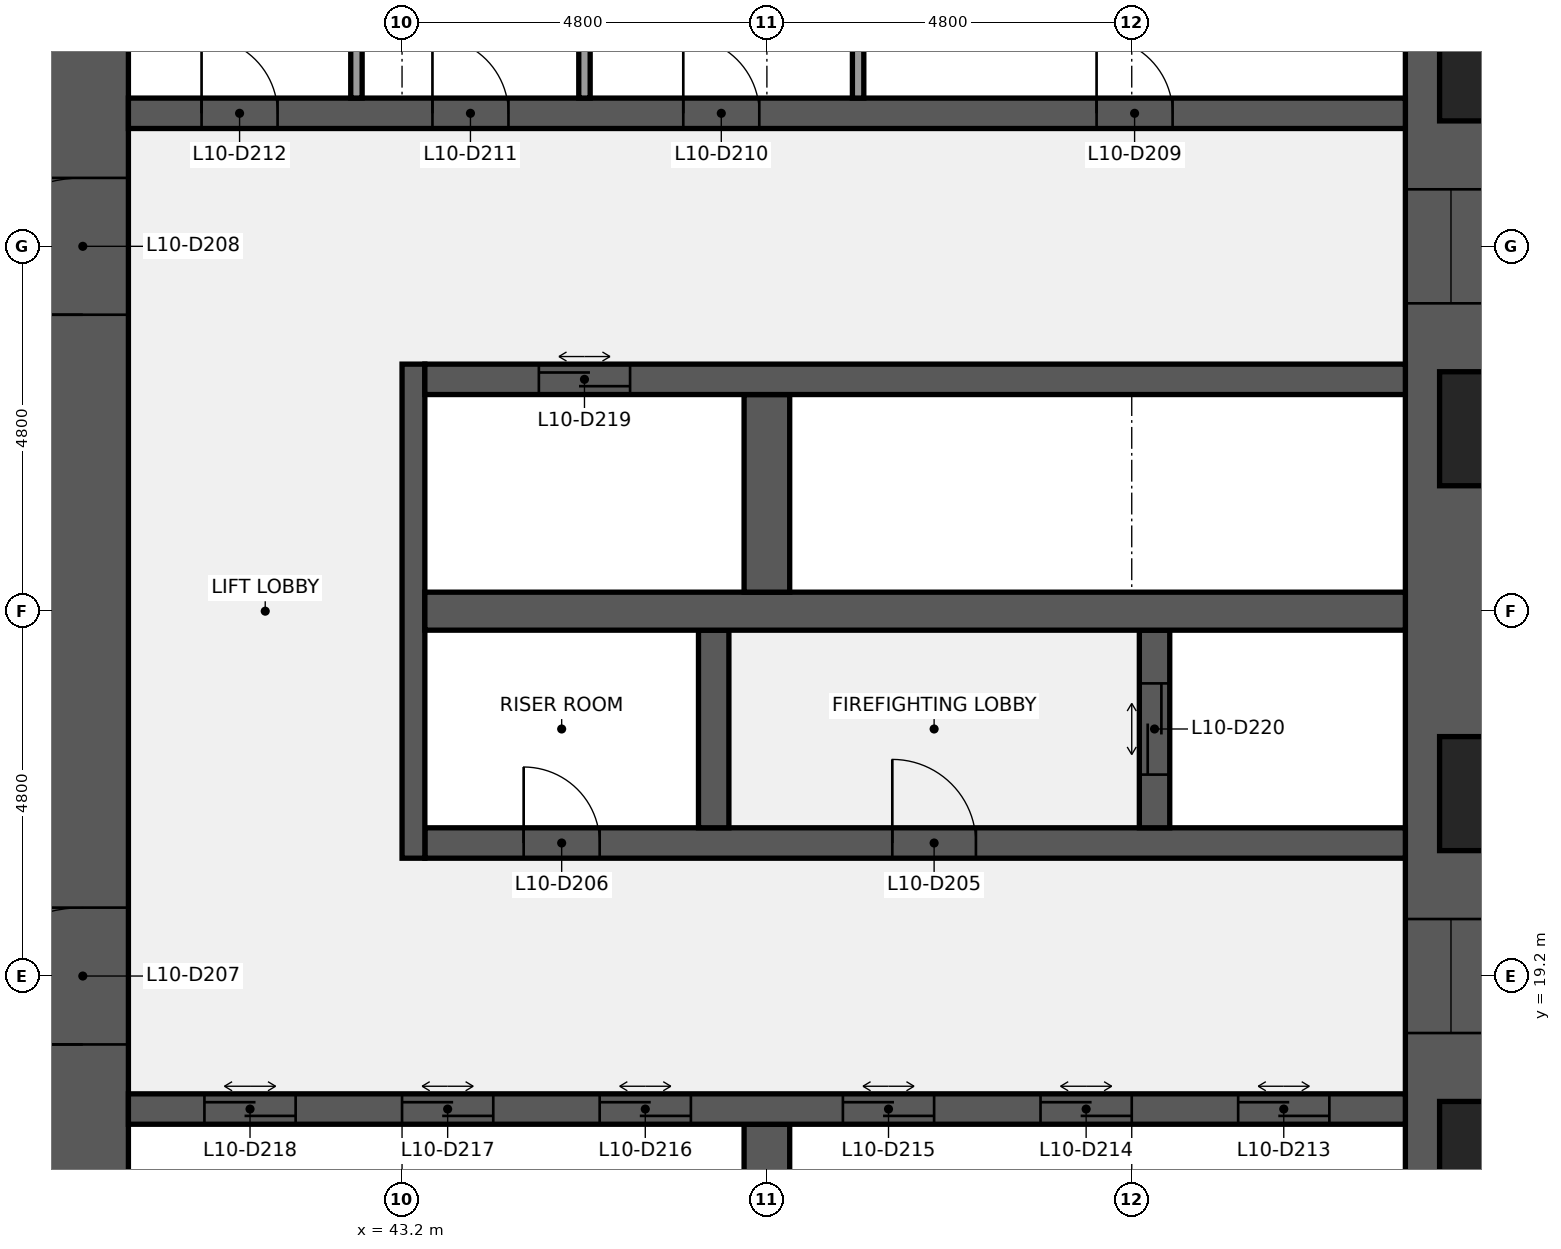
"""IFC4 building model, lengths in metres.
Left out: names, types, materials, properties, quantities, classifications, styles, units other than length and angle.
Written with IfcOpenShell. Run it as: python <this file> out.ifc"""

import sys

from ifc_helpers import new_model, si_unit, direction, frame, frame_2d, origin, place, context, subcontext, project, spatial, rectangle, extrude, element, fill, save


model = new_model("IFC4")
c1 = context("Model", 3, precision=1e-05, world=origin(), true_north=direction((0.0, 1.0)))
c2 = subcontext(c1, "Body", "Model", "MODEL_VIEW")
j1 = project(units=[si_unit("LENGTHUNIT", "METRE"), si_unit("PLANEANGLEUNIT", "RADIAN")], contexts=[c1])
p1 = place(None, origin())
s1 = spatial("IfcSite", under=j1, at=p1, CompositionType="ELEMENT")
p2 = place(p1, origin())
s2 = spatial("IfcBuilding", under=s1, at=p2, CompositionType="ELEMENT")
p3 = place(p2, frame((0.0, 0.0, 51.0)))
s3 = spatial("IfcBuildingStorey", under=s2, at=p3, CompositionType="ELEMENT", Elevation=51.0)
p4 = place(p3, frame((57.0, 38.4, 0.0), z_axis=(0.0, 0.0, 1.0), x_axis=(0.0, -1.0, 0.0)))
e1 = element("IfcWall", 1, at=p4, inside=s3, PredefinedType="SHEAR", context=c2, shape_type="SweptSolid", body=[
    extrude(rectangle(XDim=28.8, YDim=1.2, at=frame_2d((14.4, 0.0))), origin(), (0.0, 0.0, 1.0), 3.84),
])
p5 = place(p4, frame((18.45, 0.0, 0.9)))
e2 = element("IfcOpeningElement", 2, at=p5, cuts=e1, PredefinedType="OPENING", context=c2, shape_type="SweptSolid", body=[
    extrude(rectangle(XDim=1.5, YDim=1.5, at=frame_2d((0.75, 0.75))), frame((0.0, 0.61, 0.0), z_axis=(0.0, -1.0, 0.0), x_axis=(1.0, 0.0, 0.0)), (0.0, 0.0, 1.0), 1.22),
])
p6 = place(p4, frame((8.85, 0.0, 0.9)))
e3 = element("IfcOpeningElement", 3, at=p6, cuts=e1, PredefinedType="OPENING", context=c2, shape_type="SweptSolid", body=[
    extrude(rectangle(XDim=1.5, YDim=1.5, at=frame_2d((0.75, 0.75))), frame((0.0, 0.61, 0.0), z_axis=(0.0, -1.0, 0.0), x_axis=(1.0, 0.0, 0.0)), (0.0, 0.0, 1.0), 1.22),
])
p7 = place(p3, frame((39.0, 9.6, 0.0), z_axis=(0.0, 0.0, 1.0), x_axis=(0.0, 1.0, 0.0)))
e4 = element("IfcWall", 4, at=p7, inside=s3, PredefinedType="SHEAR", context=c2, shape_type="SweptSolid", body=[
    extrude(rectangle(XDim=28.8, YDim=1.2, at=frame_2d((14.4, 0.0))), origin(), (0.0, 0.0, 1.0), 3.84),
])
p8 = place(p7, frame((8.7, 0.0, 0.0)))
e5 = element("IfcOpeningElement", 5, at=p8, cuts=e4, PredefinedType="OPENING", context=c2, shape_type="SweptSolid", body=[
    extrude(rectangle(XDim=1.8, YDim=2.1, at=frame_2d((0.9, 1.05))), frame((0.0, 0.61, 0.0), z_axis=(0.0, -1.0, 0.0), x_axis=(1.0, 0.0, 0.0)), (0.0, 0.0, 1.0), 1.22),
])
p9 = place(p7, frame((18.3, 0.0, 0.0)))
e6 = element("IfcOpeningElement", 6, at=p9, cuts=e4, PredefinedType="OPENING", context=c2, shape_type="SweptSolid", body=[
    extrude(rectangle(XDim=1.8, YDim=2.1, at=frame_2d((0.9, 1.05))), frame((0.0, 0.61, 0.0), z_axis=(0.0, -1.0, 0.0), x_axis=(1.0, 0.0, 0.0)), (0.0, 0.0, 1.0), 1.22),
])
p10 = place(p3, frame((48.0, 14.65, 0.0), z_axis=(0.0, 0.0, 1.0), x_axis=(0.0, 1.0, 0.0)))
e7 = element("IfcWall", 7, at=p10, inside=s3, PredefinedType="SHEAR", context=c2, shape_type="SweptSolid", body=[
    extrude(rectangle(XDim=2.6, YDim=0.6, at=frame_2d((1.3, 0.0))), origin(), (0.0, 0.0, 1.0), 3.84),
])
p11 = place(p3, frame((39.6, 17.45, 0.0), z_axis=(0.0, 0.0, 1.0), x_axis=(1.0, 0.0, 0.0)))
e8 = element("IfcWall", 8, at=p11, inside=s3, PredefinedType="SHEAR", context=c2, shape_type="SweptSolid", body=[
    extrude(rectangle(XDim=16.8, YDim=0.4, at=frame_2d((8.4, 0.0))), origin(), (0.0, 0.0, 1.0), 3.84),
])
p12 = place(p11, frame((14.6, 0.0, 0.0)))
e9 = element("IfcOpeningElement", 9, at=p12, cuts=e8, PredefinedType="OPENING", context=c2, shape_type="SweptSolid", body=[
    extrude(rectangle(XDim=1.2, YDim=2.1, at=frame_2d((0.6, 1.05))), frame((0.0, 0.21, 0.0), z_axis=(0.0, -1.0, 0.0), x_axis=(1.0, 0.0, 0.0)), (0.0, 0.0, 1.0), 0.42),
])
p13 = place(p11, frame((12.0, 0.0, 0.0)))
e10 = element("IfcOpeningElement", 10, at=p13, cuts=e8, PredefinedType="OPENING", context=c2, shape_type="SweptSolid", body=[
    extrude(rectangle(XDim=1.2, YDim=2.1, at=frame_2d((0.6, 1.05))), frame((0.0, 0.21, 0.0), z_axis=(0.0, -1.0, 0.0), x_axis=(1.0, 0.0, 0.0)), (0.0, 0.0, 1.0), 0.42),
])
p14 = place(p11, frame((9.4, 0.0, 0.0)))
e11 = element("IfcOpeningElement", 11, at=p14, cuts=e8, PredefinedType="OPENING", context=c2, shape_type="SweptSolid", body=[
    extrude(rectangle(XDim=1.2, YDim=2.1, at=frame_2d((0.6, 1.05))), frame((0.0, 0.21, 0.0), z_axis=(0.0, -1.0, 0.0), x_axis=(1.0, 0.0, 0.0)), (0.0, 0.0, 1.0), 0.42),
])
p15 = place(p11, frame((6.2, 0.0, 0.0)))
e12 = element("IfcOpeningElement", 12, at=p15, cuts=e8, PredefinedType="OPENING", context=c2, shape_type="SweptSolid", body=[
    extrude(rectangle(XDim=1.2, YDim=2.1, at=frame_2d((0.6, 1.05))), frame((0.0, 0.21, 0.0), z_axis=(0.0, -1.0, 0.0), x_axis=(1.0, 0.0, 0.0)), (0.0, 0.0, 1.0), 0.42),
])
p16 = place(p11, frame((3.6, 0.0, 0.0)))
e13 = element("IfcOpeningElement", 13, at=p16, cuts=e8, PredefinedType="OPENING", context=c2, shape_type="SweptSolid", body=[
    extrude(rectangle(XDim=1.2, YDim=2.1, at=frame_2d((0.6, 1.05))), frame((0.0, 0.21, 0.0), z_axis=(0.0, -1.0, 0.0), x_axis=(1.0, 0.0, 0.0)), (0.0, 0.0, 1.0), 0.42),
])
p17 = place(p11, frame((1.0, 0.0, 0.0)))
e14 = element("IfcOpeningElement", 14, at=p17, cuts=e8, PredefinedType="OPENING", context=c2, shape_type="SweptSolid", body=[
    extrude(rectangle(XDim=1.2, YDim=2.1, at=frame_2d((0.6, 1.05))), frame((0.0, 0.21, 0.0), z_axis=(0.0, -1.0, 0.0), x_axis=(1.0, 0.0, 0.0)), (0.0, 0.0, 1.0), 0.42),
])
p18 = place(p3, frame((43.5, 20.95, 0.0), z_axis=(0.0, 0.0, 1.0), x_axis=(1.0, 0.0, 0.0)))
e15 = element("IfcWall", 15, at=p18, inside=s3, PredefinedType="SHEAR", context=c2, shape_type="SweptSolid", body=[
    extrude(rectangle(XDim=12.9, YDim=0.4, at=frame_2d((6.45, 0.0))), origin(), (0.0, 0.0, 1.0), 3.84),
])
p19 = place(p18, frame((6.15, 0.0, 0.0)))
e16 = element("IfcOpeningElement", 16, at=p19, cuts=e15, PredefinedType="OPENING", context=c2, shape_type="SweptSolid", body=[
    extrude(rectangle(XDim=1.1, YDim=2.1, at=frame_2d((0.55, 1.05))), frame((0.0, 0.21, 0.0), z_axis=(0.0, -1.0, 0.0), x_axis=(1.0, 0.0, 0.0)), (0.0, 0.0, 1.0), 0.42),
])
p20 = place(p18, frame((1.3, 0.0, 0.0)))
e17 = element("IfcOpeningElement", 17, at=p20, cuts=e15, PredefinedType="OPENING", context=c2, shape_type="SweptSolid", body=[
    extrude(rectangle(XDim=1.0, YDim=2.1, at=frame_2d((0.5, 1.05))), frame((0.0, 0.21, 0.0), z_axis=(0.0, -1.0, 0.0), x_axis=(1.0, 0.0, 0.0)), (0.0, 0.0, 1.0), 0.42),
])
p21 = place(p3, frame((43.35, 20.75, 0.0), z_axis=(0.0, 0.0, 1.0), x_axis=(0.0, 1.0, 0.0)))
e18 = element("IfcWall", 18, at=p21, inside=s3, PredefinedType="SHEAR", context=c2, shape_type="SweptSolid", body=[
    extrude(rectangle(XDim=6.5, YDim=0.3, at=frame_2d((3.25, 0.0))), origin(), (0.0, 0.0, 1.0), 3.84),
])
p22 = place(p3, frame((53.1, 21.15, 0.0), z_axis=(0.0, 0.0, 1.0), x_axis=(0.0, 1.0, 0.0)))
e19 = element("IfcWall", 19, at=p22, inside=s3, PredefinedType="SHEAR", context=c2, shape_type="SweptSolid", body=[
    extrude(rectangle(XDim=2.6, YDim=0.4, at=frame_2d((1.3, 0.0))), origin(), (0.0, 0.0, 1.0), 3.84),
])
p23 = place(p22, frame((0.7, 0.0, 0.0)))
e20 = element("IfcOpeningElement", 20, at=p23, cuts=e19, PredefinedType="OPENING", context=c2, shape_type="SweptSolid", body=[
    extrude(rectangle(XDim=1.2, YDim=2.1, at=frame_2d((0.6, 1.05))), frame((0.0, 0.21, 0.0), z_axis=(0.0, -1.0, 0.0), x_axis=(1.0, 0.0, 0.0)), (0.0, 0.0, 1.0), 0.42),
])
p24 = place(p3, frame((47.3, 21.15, 0.0), z_axis=(0.0, 0.0, 1.0), x_axis=(0.0, 1.0, 0.0)))
e21 = element("IfcWall", 21, at=p24, inside=s3, PredefinedType="SHEAR", context=c2, shape_type="SweptSolid", body=[
    extrude(rectangle(XDim=2.6, YDim=0.4, at=frame_2d((1.3, 0.0))), origin(), (0.0, 0.0, 1.0), 3.84),
])
p25 = place(p3, frame((43.5, 24.0, 0.0), z_axis=(0.0, 0.0, 1.0), x_axis=(1.0, 0.0, 0.0)))
e22 = element("IfcWall", 22, at=p25, inside=s3, PredefinedType="SHEAR", context=c2, shape_type="SweptSolid", body=[
    extrude(rectangle(XDim=12.9, YDim=0.5, at=frame_2d((6.45, 0.0))), origin(), (0.0, 0.0, 1.0), 3.84),
])
p26 = place(p3, frame((48.0, 24.25, 0.0), z_axis=(0.0, 0.0, 1.0), x_axis=(0.0, 1.0, 0.0)))
e23 = element("IfcWall", 23, at=p26, inside=s3, PredefinedType="SHEAR", context=c2, shape_type="SweptSolid", body=[
    extrude(rectangle(XDim=2.6, YDim=0.6, at=frame_2d((1.3, 0.0))), origin(), (0.0, 0.0, 1.0), 3.84),
])
p27 = place(p3, frame((43.5, 27.05, 0.0), z_axis=(0.0, 0.0, 1.0), x_axis=(1.0, 0.0, 0.0)))
e24 = element("IfcWall", 24, at=p27, inside=s3, PredefinedType="SHEAR", context=c2, shape_type="SweptSolid", body=[
    extrude(rectangle(XDim=12.9, YDim=0.4, at=frame_2d((6.45, 0.0))), origin(), (0.0, 0.0, 1.0), 3.84),
])
p28 = place(p27, frame((1.5, 0.0, 0.0)))
e25 = element("IfcOpeningElement", 25, at=p28, cuts=e24, PredefinedType="OPENING", context=c2, shape_type="SweptSolid", body=[
    extrude(rectangle(XDim=1.2, YDim=2.1, at=frame_2d((0.6, 1.05))), frame((0.0, 0.21, 0.0), z_axis=(0.0, -1.0, 0.0), x_axis=(1.0, 0.0, 0.0)), (0.0, 0.0, 1.0), 0.42),
])
p29 = place(p3, frame((39.6, 30.55, 0.0), z_axis=(0.0, 0.0, 1.0), x_axis=(1.0, 0.0, 0.0)))
e26 = element("IfcWall", 26, at=p29, inside=s3, PredefinedType="SHEAR", context=c2, shape_type="SweptSolid", body=[
    extrude(rectangle(XDim=16.8, YDim=0.4, at=frame_2d((8.4, 0.0))), origin(), (0.0, 0.0, 1.0), 3.84),
])
p30 = place(p29, frame((12.738, 0.0, 0.0)))
e27 = element("IfcOpeningElement", 27, at=p30, cuts=e26, PredefinedType="OPENING", context=c2, shape_type="SweptSolid", body=[
    extrude(rectangle(XDim=1.0, YDim=2.1, at=frame_2d((0.5, 1.05))), frame((0.0, 0.21, 0.0), z_axis=(0.0, -1.0, 0.0), x_axis=(1.0, 0.0, 0.0)), (0.0, 0.0, 1.0), 0.42),
])
p31 = place(p29, frame((7.3, 0.0, 0.0)))
e28 = element("IfcOpeningElement", 28, at=p31, cuts=e26, PredefinedType="OPENING", context=c2, shape_type="SweptSolid", body=[
    extrude(rectangle(XDim=1.0, YDim=2.1, at=frame_2d((0.5, 1.05))), frame((0.0, 0.21, 0.0), z_axis=(0.0, -1.0, 0.0), x_axis=(1.0, 0.0, 0.0)), (0.0, 0.0, 1.0), 0.42),
])
p32 = place(p29, frame((4.0, 0.0, 0.0)))
e29 = element("IfcOpeningElement", 29, at=p32, cuts=e26, PredefinedType="OPENING", context=c2, shape_type="SweptSolid", body=[
    extrude(rectangle(XDim=1.0, YDim=2.1, at=frame_2d((0.5, 1.05))), frame((0.0, 0.21, 0.0), z_axis=(0.0, -1.0, 0.0), x_axis=(1.0, 0.0, 0.0)), (0.0, 0.0, 1.0), 0.42),
])
p33 = place(p29, frame((0.962, 0.0, 0.0)))
e30 = element("IfcOpeningElement", 30, at=p33, cuts=e26, PredefinedType="OPENING", context=c2, shape_type="SweptSolid", body=[
    extrude(rectangle(XDim=1.0, YDim=2.1, at=frame_2d((0.5, 1.05))), frame((0.0, 0.21, 0.0), z_axis=(0.0, -1.0, 0.0), x_axis=(1.0, 0.0, 0.0)), (0.0, 0.0, 1.0), 0.42),
])
for number, where, z_axis, x_axis in (
    (31, (49.2, 30.75, 0.0), (0.0, 0.0, 1.0), (0.0, 1.0, 0.0)),
    (32, (45.6, 30.75, 0.0), (0.0, 0.0, 1.0), (0.0, 1.0, 0.0)),
    (33, (42.6, 30.75, 0.0), (0.0, 0.0, 1.0), (0.0, 1.0, 0.0)),
):
    element("IfcWall", number, at=place(p3, frame(where, z_axis=z_axis, x_axis=x_axis)), inside=s3, PredefinedType="PARTITIONING", context=c2, shape_type="SweptSolid", body=[
        extrude(rectangle(XDim=2.6, YDim=0.15, at=frame_2d((1.3, 0.0))), origin(), (0.0, 0.0, 1.0), 3.84),
    ])
p34 = place(p19, origin())
e34 = element("IfcDoor", 34, at=p34, inside=s3, OperationType="SINGLE_SWING_LEFT", PredefinedType="DOOR", context=c2, shape_type="SweptSolid", body=[
    extrude(rectangle(XDim=1.1, YDim=2.1, at=frame_2d((0.55, 1.05))), frame((0.0, 0.025, 0.0), z_axis=(0.0, -1.0, 0.0), x_axis=(1.0, 0.0, 0.0)), (0.0, 0.0, 1.0), 0.05),
])
fill(e16, e34)
p35 = place(p20, origin())
e35 = element("IfcDoor", 35, at=p35, inside=s3, OperationType="SINGLE_SWING_LEFT", PredefinedType="DOOR", context=c2, shape_type="SweptSolid", body=[
    extrude(rectangle(XDim=1.0, YDim=2.1, at=frame_2d((0.5, 1.05))), frame((0.0, 0.025, 0.0), z_axis=(0.0, -1.0, 0.0), x_axis=(1.0, 0.0, 0.0)), (0.0, 0.0, 1.0), 0.05),
])
fill(e17, e35)
p36 = place(p8, origin())
e36 = element("IfcDoor", 36, at=p36, inside=s3, OperationType="DOUBLE_DOOR_SINGLE_SWING", PredefinedType="DOOR", context=c2, shape_type="SweptSolid", body=[
    extrude(rectangle(XDim=1.8, YDim=2.1, at=frame_2d((0.9, 1.05))), frame((0.0, 0.025, 0.0), z_axis=(0.0, -1.0, 0.0), x_axis=(1.0, 0.0, 0.0)), (0.0, 0.0, 1.0), 0.05),
])
fill(e5, e36)
p37 = place(p9, origin())
e37 = element("IfcDoor", 37, at=p37, inside=s3, OperationType="DOUBLE_DOOR_SINGLE_SWING", PredefinedType="DOOR", context=c2, shape_type="SweptSolid", body=[
    extrude(rectangle(XDim=1.8, YDim=2.1, at=frame_2d((0.9, 1.05))), frame((0.0, 0.025, 0.0), z_axis=(0.0, -1.0, 0.0), x_axis=(1.0, 0.0, 0.0)), (0.0, 0.0, 1.0), 0.05),
])
fill(e6, e37)
p38 = place(p30, origin())
e38 = element("IfcDoor", 38, at=p38, inside=s3, OperationType="SINGLE_SWING_LEFT", PredefinedType="DOOR", context=c2, shape_type="SweptSolid", body=[
    extrude(rectangle(XDim=1.0, YDim=2.1, at=frame_2d((0.5, 1.05))), frame((0.0, 0.025, 0.0), z_axis=(0.0, -1.0, 0.0), x_axis=(1.0, 0.0, 0.0)), (0.0, 0.0, 1.0), 0.05),
])
fill(e27, e38)
p39 = place(p31, origin())
e39 = element("IfcDoor", 39, at=p39, inside=s3, OperationType="SINGLE_SWING_LEFT", PredefinedType="DOOR", context=c2, shape_type="SweptSolid", body=[
    extrude(rectangle(XDim=1.0, YDim=2.1, at=frame_2d((0.5, 1.05))), frame((0.0, 0.025, 0.0), z_axis=(0.0, -1.0, 0.0), x_axis=(1.0, 0.0, 0.0)), (0.0, 0.0, 1.0), 0.05),
])
fill(e28, e39)
p40 = place(p32, origin())
e40 = element("IfcDoor", 40, at=p40, inside=s3, OperationType="SINGLE_SWING_LEFT", PredefinedType="DOOR", context=c2, shape_type="SweptSolid", body=[
    extrude(rectangle(XDim=1.0, YDim=2.1, at=frame_2d((0.5, 1.05))), frame((0.0, 0.025, 0.0), z_axis=(0.0, -1.0, 0.0), x_axis=(1.0, 0.0, 0.0)), (0.0, 0.0, 1.0), 0.05),
])
fill(e29, e40)
p41 = place(p33, origin())
e41 = element("IfcDoor", 41, at=p41, inside=s3, OperationType="SINGLE_SWING_LEFT", PredefinedType="DOOR", context=c2, shape_type="SweptSolid", body=[
    extrude(rectangle(XDim=1.0, YDim=2.1, at=frame_2d((0.5, 1.05))), frame((0.0, 0.025, 0.0), z_axis=(0.0, -1.0, 0.0), x_axis=(1.0, 0.0, 0.0)), (0.0, 0.0, 1.0), 0.05),
])
fill(e30, e41)
p42 = place(p12, origin())
e42 = element("IfcDoor", 42, at=p42, inside=s3, OperationType="DOUBLE_DOOR_SLIDING", PredefinedType="DOOR", context=c2, shape_type="SweptSolid", body=[
    extrude(rectangle(XDim=1.2, YDim=2.1, at=frame_2d((0.6, 1.05))), frame((0.0, 0.025, 0.0), z_axis=(0.0, -1.0, 0.0), x_axis=(1.0, 0.0, 0.0)), (0.0, 0.0, 1.0), 0.05),
])
fill(e9, e42)
p43 = place(p13, origin())
e43 = element("IfcDoor", 43, at=p43, inside=s3, OperationType="DOUBLE_DOOR_SLIDING", PredefinedType="DOOR", context=c2, shape_type="SweptSolid", body=[
    extrude(rectangle(XDim=1.2, YDim=2.1, at=frame_2d((0.6, 1.05))), frame((0.0, 0.025, 0.0), z_axis=(0.0, -1.0, 0.0), x_axis=(1.0, 0.0, 0.0)), (0.0, 0.0, 1.0), 0.05),
])
fill(e10, e43)
p44 = place(p14, origin())
e44 = element("IfcDoor", 44, at=p44, inside=s3, OperationType="DOUBLE_DOOR_SLIDING", PredefinedType="DOOR", context=c2, shape_type="SweptSolid", body=[
    extrude(rectangle(XDim=1.2, YDim=2.1, at=frame_2d((0.6, 1.05))), frame((0.0, 0.025, 0.0), z_axis=(0.0, -1.0, 0.0), x_axis=(1.0, 0.0, 0.0)), (0.0, 0.0, 1.0), 0.05),
])
fill(e11, e44)
p45 = place(p15, origin())
e45 = element("IfcDoor", 45, at=p45, inside=s3, OperationType="DOUBLE_DOOR_SLIDING", PredefinedType="DOOR", context=c2, shape_type="SweptSolid", body=[
    extrude(rectangle(XDim=1.2, YDim=2.1, at=frame_2d((0.6, 1.05))), frame((0.0, 0.025, 0.0), z_axis=(0.0, -1.0, 0.0), x_axis=(1.0, 0.0, 0.0)), (0.0, 0.0, 1.0), 0.05),
])
fill(e12, e45)
p46 = place(p16, origin())
e46 = element("IfcDoor", 46, at=p46, inside=s3, OperationType="DOUBLE_DOOR_SLIDING", PredefinedType="DOOR", context=c2, shape_type="SweptSolid", body=[
    extrude(rectangle(XDim=1.2, YDim=2.1, at=frame_2d((0.6, 1.05))), frame((0.0, 0.025, 0.0), z_axis=(0.0, -1.0, 0.0), x_axis=(1.0, 0.0, 0.0)), (0.0, 0.0, 1.0), 0.05),
])
fill(e13, e46)
p47 = place(p17, origin())
e47 = element("IfcDoor", 47, at=p47, inside=s3, OperationType="DOUBLE_DOOR_SLIDING", PredefinedType="DOOR", context=c2, shape_type="SweptSolid", body=[
    extrude(rectangle(XDim=1.2, YDim=2.1, at=frame_2d((0.6, 1.05))), frame((0.0, 0.025, 0.0), z_axis=(0.0, -1.0, 0.0), x_axis=(1.0, 0.0, 0.0)), (0.0, 0.0, 1.0), 0.05),
])
fill(e14, e47)
p48 = place(p28, origin())
e48 = element("IfcDoor", 48, at=p48, inside=s3, OperationType="DOUBLE_DOOR_SLIDING", PredefinedType="DOOR", context=c2, shape_type="SweptSolid", body=[
    extrude(rectangle(XDim=1.2, YDim=2.1, at=frame_2d((0.6, 1.05))), frame((0.0, 0.025, 0.0), z_axis=(0.0, -1.0, 0.0), x_axis=(1.0, 0.0, 0.0)), (0.0, 0.0, 1.0), 0.05),
])
fill(e25, e48)
p49 = place(p23, origin())
e49 = element("IfcDoor", 49, at=p49, inside=s3, OperationType="DOUBLE_DOOR_SLIDING", PredefinedType="DOOR", context=c2, shape_type="SweptSolid", body=[
    extrude(rectangle(XDim=1.2, YDim=2.1, at=frame_2d((0.6, 1.05))), frame((0.0, 0.025, 0.0), z_axis=(0.0, -1.0, 0.0), x_axis=(1.0, 0.0, 0.0)), (0.0, 0.0, 1.0), 0.05),
])
fill(e20, e49)
p50 = place(p5, origin())
e50 = element("IfcWindow", 50, at=p50, inside=s3, PartitioningType="SINGLE_PANEL", PredefinedType="WINDOW", context=c2, shape_type="SweptSolid", body=[
    extrude(rectangle(XDim=1.5, YDim=1.5, at=frame_2d((0.75, 0.75))), frame((0.0, 0.03, 0.0), z_axis=(0.0, -1.0, 0.0), x_axis=(1.0, 0.0, 0.0)), (0.0, 0.0, 1.0), 0.06),
])
fill(e2, e50)
p51 = place(p6, origin())
e51 = element("IfcWindow", 51, at=p51, inside=s3, PartitioningType="SINGLE_PANEL", PredefinedType="WINDOW", context=c2, shape_type="SweptSolid", body=[
    extrude(rectangle(XDim=1.5, YDim=1.5, at=frame_2d((0.75, 0.75))), frame((0.0, 0.03, 0.0), z_axis=(0.0, -1.0, 0.0), x_axis=(1.0, 0.0, 0.0)), (0.0, 0.0, 1.0), 0.06),
])
fill(e3, e51)
save(model, sys.argv[1])
